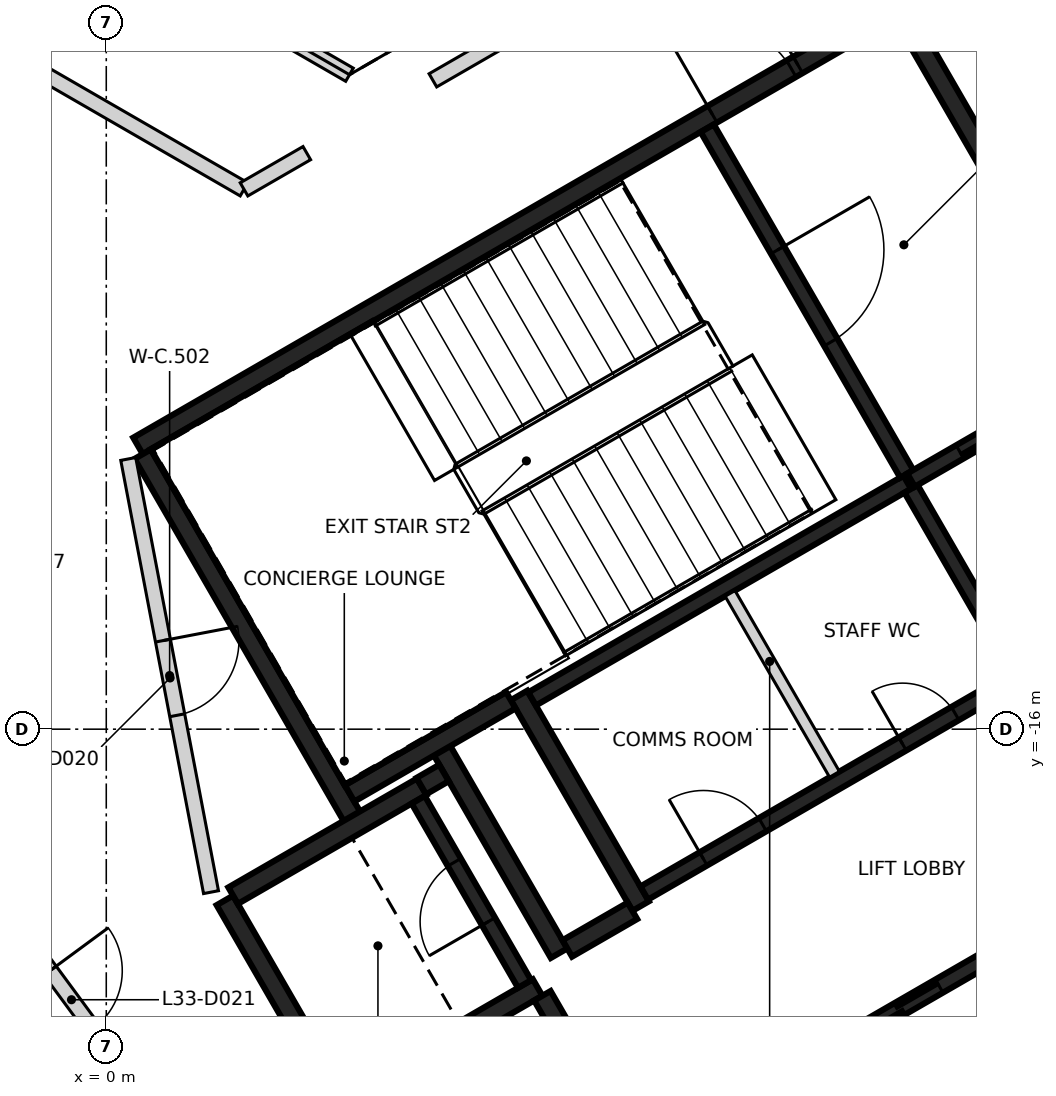
"""IFC4 building model, lengths in metres.
Left out: names, types, materials, properties, quantities, classifications, styles, units other than length and angle.
Written with IfcOpenShell. Run it as: python <this file> out.ifc"""

import sys

from ifc_helpers import new_model, si_unit, direction, frame, frame_2d, origin, place, context, subcontext, project, spatial, rectangle, extrude, element, fill, save


model = new_model("IFC4")
c1 = context("Model", 3, precision=1e-05, world=origin(), true_north=direction((0.0, 1.0)))
c2 = subcontext(c1, "Body", "Model", "MODEL_VIEW")
j1 = project(units=[si_unit("LENGTHUNIT", "METRE"), si_unit("PLANEANGLEUNIT", "RADIAN")], contexts=[c1])
p1 = place(None, origin())
s1 = spatial("IfcSite", under=j1, at=p1, CompositionType="ELEMENT")
p2 = place(p1, origin())
s2 = spatial("IfcBuilding", under=s1, at=p2, CompositionType="ELEMENT")
p3 = place(p2, frame((0.0, 0.0, 136.0)))
s3 = spatial("IfcBuildingStorey", under=s2, at=p3, CompositionType="ELEMENT", Elevation=136.0)
p4 = place(p3, frame((0.417, -12.273, 0.0), z_axis=(0.0, 0.0, 1.0), x_axis=(0.866021906294, 0.500006057782, 0.0)))
e1 = element("IfcWall", 1, at=p4, inside=s3, PredefinedType="SHEAR", context=c2, shape_type="SweptSolid", body=[
    extrude(rectangle(XDim=11.55, YDim=0.25, at=frame_2d((5.775, 0.0))), origin(), (0.0, 0.0, 1.0), 3.2),
])
p5 = place(p4, frame((10.025, 0.0, 0.0)))
e2 = element("IfcOpeningElement", 2, at=p5, cuts=e1, PredefinedType="OPENING", context=c2, shape_type="SweptSolid", body=[
    extrude(rectangle(XDim=1.2, YDim=2.1, at=frame_2d((0.6, 1.05))), frame((0.0, 0.135, 0.0), z_axis=(0.0, -1.0, 0.0), x_axis=(1.0, 0.0, 0.0)), (0.0, 0.0, 1.0), 0.27),
])
p6 = place(p4, frame((8.725, 0.0, 0.0)))
e3 = element("IfcOpeningElement", 3, at=p6, cuts=e1, PredefinedType="OPENING", context=c2, shape_type="SweptSolid", body=[
    extrude(rectangle(XDim=1.2, YDim=2.1, at=frame_2d((0.6, 1.05))), frame((0.0, 0.135, 0.0), z_axis=(0.0, -1.0, 0.0), x_axis=(1.0, 0.0, 0.0)), (0.0, 0.0, 1.0), 0.27),
])
p7 = place(p3, frame((3.235, -17.153, 0.0), z_axis=(0.0, 0.0, 1.0), x_axis=(-0.500008851346, 0.866020293397, 0.0)))
e4 = element("IfcWall", 4, at=p7, inside=s3, PredefinedType="SHEAR", context=c2, shape_type="SweptSolid", body=[
    extrude(rectangle(XDim=5.51, YDim=0.25, at=frame_2d((2.755, 0.0))), origin(), (0.0, 0.0, 1.0), 3.2),
])
p8 = place(p3, frame((10.483, -6.606, 0.0), z_axis=(0.0, 0.0, 1.0), x_axis=(0.49999885962, -0.866026062182, 0.0)))
e5 = element("IfcWall", 5, at=p8, inside=s3, PredefinedType="SHEAR", context=c2, shape_type="SweptSolid", body=[
    extrude(rectangle(XDim=5.225, YDim=0.25, at=frame_2d((2.612, 0.0))), origin(), (0.0, 0.0, 1.0), 3.2),
])
p9 = place(p3, frame((7.031, -18.327, 0.0), z_axis=(0.0, 0.0, 1.0), x_axis=(-0.499971222258, 0.866042017984, 0.0)))
e6 = element("IfcWall", 6, at=p9, inside=s3, PredefinedType="SHEAR", context=c2, shape_type="SweptSolid", body=[
    extrude(rectangle(XDim=3.2, YDim=0.25, at=frame_2d((1.6, 0.0))), origin(), (0.0, 0.0, 1.0), 3.2),
])
p10 = place(p3, frame((3.085, -20.894, 0.0), z_axis=(0.0, 0.0, 1.0), x_axis=(-0.499978833458, 0.866037623948, 0.0)))
e7 = element("IfcWall", 7, at=p10, inside=s3, PredefinedType="SHEAR", context=c2, shape_type="SweptSolid", body=[
    extrude(rectangle(XDim=3.05, YDim=0.25, at=frame_2d((1.525, 0.0))), origin(), (0.0, 0.0, 1.0), 3.2),
])
p11 = place(p3, frame((1.669, -18.19, 0.0), z_axis=(0.0, 0.0, 1.0), x_axis=(0.866042235819, 0.499970844928, 0.0)))
e8 = element("IfcWall", 8, at=p11, inside=s3, PredefinedType="SHEAR", context=c2, shape_type="SweptSolid", body=[
    extrude(rectangle(XDim=2.865, YDim=0.25, at=frame_2d((1.432, 0.0))), origin(), (0.0, 0.0, 1.0), 3.2),
])
p12 = place(p3, frame((5.675, -19.399, 0.0), z_axis=(0.0, 0.0, 1.0), x_axis=(-0.866026637627, -0.499997862916, 0.0)))
e9 = element("IfcWall", 9, at=p12, inside=s3, PredefinedType="SHEAR", context=c2, shape_type="SweptSolid", body=[
    extrude(rectangle(XDim=2.865, YDim=0.25, at=frame_2d((1.432, 0.0))), origin(), (0.0, 0.0, 1.0), 3.2),
])
p13 = place(p3, frame((4.414, -16.276, 0.0), z_axis=(0.0, 0.0, 1.0), x_axis=(0.500003324108, -0.866023484601, 0.0)))
e10 = element("IfcWall", 10, at=p13, inside=s3, PredefinedType="SHEAR", context=c2, shape_type="SweptSolid", body=[
    extrude(rectangle(XDim=3.085, YDim=0.25, at=frame_2d((1.542, 0.0))), origin(), (0.0, 0.0, 1.0), 3.2),
])
p14 = place(p3, frame((5.322, -15.619, 0.0), z_axis=(0.0, 0.0, 1.0), x_axis=(-0.866026229868, -0.499998569178, 0.0)))
e11 = element("IfcWall", 11, at=p14, inside=s3, PredefinedType="SHEAR", context=c2, shape_type="SweptSolid", body=[
    extrude(rectangle(XDim=2.449, YDim=0.25, at=frame_2d((1.225, 0.0))), origin(), (0.0, 0.0, 1.0), 3.2),
])
p15 = place(p3, frame((6.065, -18.885, 0.0), z_axis=(0.0, 0.0, 1.0), x_axis=(0.866017078145, 0.500014420154, 0.0)))
e12 = element("IfcWall", 12, at=p15, inside=s3, PredefinedType="SHEAR", context=c2, shape_type="SweptSolid", body=[
    extrude(rectangle(XDim=0.989, YDim=0.25, at=frame_2d((0.495, 0.0))), origin(), (0.0, 0.0, 1.0), 3.2),
])
p16 = place(p3, frame((6.08, -20.1, 0.0), z_axis=(0.0, 0.0, 1.0), x_axis=(-0.500051773299, 0.865995510393, 0.0)))
e13 = element("IfcWall", 13, at=p16, inside=s3, PredefinedType="SHEAR", context=c2, shape_type="SweptSolid", body=[
    extrude(rectangle(XDim=0.685, YDim=0.25, at=frame_2d((0.342, 0.0))), origin(), (0.0, 0.0, 1.0), 3.2),
])
p17 = place(p3, frame((4.145, -16.749, 0.0), z_axis=(0.0, 0.0, 1.0), x_axis=(0.866185586049, 0.49972245349, 0.0)))
e14 = element("IfcWall", 14, at=p17, inside=s3, PredefinedType="SHEAR", context=c2, shape_type="SweptSolid", body=[
    extrude(rectangle(XDim=0.344, YDim=0.25, at=frame_2d((0.172, 0.0))), origin(), (0.0, 0.0, 1.0), 3.2),
])
p18 = place(p3, frame((9.052, -20.48, 0.0), z_axis=(0.0, 0.0, 1.0), x_axis=(0.866030299012, 0.499991521122, 0.0)))
e15 = element("IfcWall", 15, at=p18, inside=s3, PredefinedType="SHEAR", context=c2, shape_type="SweptSolid", body=[
    extrude(rectangle(XDim=6.1, YDim=0.2, at=frame_2d((3.05, 0.0))), origin(), (0.0, 0.0, 1.0), 3.2),
])
p19 = place(p18, frame((1.0, 0.0, 0.0)))
e16 = element("IfcOpeningElement", 16, at=p19, cuts=e15, PredefinedType="OPENING", context=c2, shape_type="SweptSolid", body=[
    extrude(rectangle(XDim=1.2, YDim=2.1, at=frame_2d((0.6, 1.05))), frame((0.0, 0.11, 0.0), z_axis=(0.0, -1.0, 0.0), x_axis=(1.0, 0.0, 0.0)), (0.0, 0.0, 1.0), 0.22),
])
p20 = place(p18, frame((4.05, 0.0, 0.0)))
e17 = element("IfcOpeningElement", 17, at=p20, cuts=e15, PredefinedType="OPENING", context=c2, shape_type="SweptSolid", body=[
    extrude(rectangle(XDim=1.2, YDim=2.1, at=frame_2d((0.6, 1.05))), frame((0.0, 0.11, 0.0), z_axis=(0.0, -1.0, 0.0), x_axis=(1.0, 0.0, 0.0)), (0.0, 0.0, 1.0), 0.22),
])
p21 = place(p3, frame((10.538, -12.752, 0.0), z_axis=(0.0, 0.0, 1.0), x_axis=(-0.866038630372, -0.499977090179, 0.0)))
e18 = element("IfcWall", 18, at=p21, inside=s3, PredefinedType="SHEAR", context=c2, shape_type="SweptSolid", body=[
    extrude(rectangle(XDim=5.699, YDim=0.2, at=frame_2d((2.85, 0.0))), origin(), (0.0, 0.0, 1.0), 3.2),
])
p22 = place(p3, frame((7.077, -18.156, 0.0), z_axis=(0.0, 0.0, 1.0), x_axis=(0.866038630372, 0.499977090179, 0.0)))
e19 = element("IfcWall", 19, at=p22, inside=s3, PredefinedType="SHEAR", context=c2, shape_type="SweptSolid", body=[
    extrude(rectangle(XDim=5.699, YDim=0.2, at=frame_2d((2.85, 0.0))), origin(), (0.0, 0.0, 1.0), 3.2),
])
p23 = place(p22, frame((0.899, 0.0, 0.0)))
e20 = element("IfcOpeningElement", 20, at=p23, cuts=e19, PredefinedType="OPENING", context=c2, shape_type="SweptSolid", body=[
    extrude(rectangle(XDim=0.9, YDim=2.1, at=frame_2d((0.45, 1.05))), frame((0.0, 0.11, 0.0), z_axis=(0.0, -1.0, 0.0), x_axis=(1.0, 0.0, 0.0)), (0.0, 0.0, 1.0), 0.22),
])
p24 = place(p22, frame((3.924, 0.0, 0.0)))
e21 = element("IfcOpeningElement", 21, at=p24, cuts=e19, PredefinedType="OPENING", context=c2, shape_type="SweptSolid", body=[
    extrude(rectangle(XDim=0.8, YDim=2.1, at=frame_2d((0.4, 1.05))), frame((0.0, 0.11, 0.0), z_axis=(0.0, -1.0, 0.0), x_axis=(1.0, 0.0, 0.0)), (0.0, 0.0, 1.0), 0.22),
])
p25 = place(p3, frame((7.906, -8.094, 0.0), z_axis=(0.0, 0.0, 1.0), x_axis=(0.500024287448, -0.866011380966, 0.0)))
e22 = element("IfcWall", 22, at=p25, inside=s3, PredefinedType="SHEAR", context=c2, shape_type="SweptSolid", body=[
    extrude(rectangle(XDim=5.251, YDim=0.2, at=frame_2d((2.625, 0.0))), origin(), (0.0, 0.0, 1.0), 3.2),
])
p26 = place(p25, frame((1.849, 0.0, 0.0)))
e23 = element("IfcOpeningElement", 23, at=p26, cuts=e22, PredefinedType="OPENING", context=c2, shape_type="SweptSolid", body=[
    extrude(rectangle(XDim=1.4, YDim=2.1, at=frame_2d((0.7, 1.05))), frame((0.0, 0.11, 0.0), z_axis=(0.0, -1.0, 0.0), x_axis=(1.0, 0.0, 0.0)), (0.0, 0.0, 1.0), 0.22),
])
p27 = place(p3, frame((5.503, -19.352, 0.0), z_axis=(0.0, 0.0, 1.0), x_axis=(-0.499986818241, 0.866033014143, 0.0)))
e24 = element("IfcWall", 24, at=p27, inside=s3, PredefinedType="SHEAR", context=c2, shape_type="SweptSolid", body=[
    extrude(rectangle(XDim=2.798, YDim=0.2, at=frame_2d((1.399, 0.0))), origin(), (0.0, 0.0, 1.0), 3.2),
])
p28 = place(p27, frame((0.949, 0.0, 0.0)))
e25 = element("IfcOpeningElement", 25, at=p28, cuts=e24, PredefinedType="OPENING", context=c2, shape_type="SweptSolid", body=[
    extrude(rectangle(XDim=0.9, YDim=2.1, at=frame_2d((0.45, 1.05))), frame((0.0, 0.11, 0.0), z_axis=(0.0, -1.0, 0.0), x_axis=(1.0, 0.0, 0.0)), (0.0, 0.0, 1.0), 0.22),
])
p29 = place(p3, frame((11.963, -15.22, 0.0), z_axis=(0.0, 0.0, 1.0), x_axis=(-0.500034990121, 0.866005201286, 0.0)))
e26 = element("IfcWall", 26, at=p29, inside=s3, PredefinedType="SHEAR", context=c2, shape_type="SweptSolid", body=[
    extrude(rectangle(XDim=2.75, YDim=0.2, at=frame_2d((1.375, 0.0))), origin(), (0.0, 0.0, 1.0), 3.2),
])
p30 = place(p3, frame((10.587, -12.723, 0.0), z_axis=(0.0, 0.0, 1.0), x_axis=(0.866037306777, 0.499979382845, 0.0)))
e27 = element("IfcWall", 27, at=p30, inside=s3, PredefinedType="SHEAR", context=c2, shape_type="SweptSolid", body=[
    extrude(rectangle(XDim=2.742, YDim=0.2, at=frame_2d((1.371, 0.0))), origin(), (0.0, 0.0, 1.0), 3.2),
])
p31 = place(p30, frame((0.743, 0.0, 0.0)))
e28 = element("IfcOpeningElement", 28, at=p31, cuts=e27, PredefinedType="OPENING", context=c2, shape_type="SweptSolid", body=[
    extrude(rectangle(XDim=1.3, YDim=2.1, at=frame_2d((0.65, 1.05))), frame((0.0, 0.11, 0.0), z_axis=(0.0, -1.0, 0.0), x_axis=(1.0, 0.0, 0.0)), (0.0, 0.0, 1.0), 0.22),
])
p32 = place(p3, frame((8.207, -14.214, 0.0), z_axis=(0.0, 0.0, 1.0), x_axis=(0.50002746344, -0.86600954718, 0.0)))
e29 = element("IfcWall", 29, at=p32, inside=s3, PredefinedType="PARTITIONING", context=c2, shape_type="SweptSolid", body=[
    extrude(rectangle(XDim=2.748, YDim=0.15, at=frame_2d((1.374, 0.0))), origin(), (0.0, 0.0, 1.0), 3.2),
])
p33 = place(p3, frame((-8.612, -2.88, 0.0), z_axis=(0.0, 0.0, 1.0), x_axis=(0.866035279512, -0.499982894348, 0.0)))
e30 = element("IfcWall", 30, at=p33, inside=s3, PredefinedType="PARTITIONING", context=c2, shape_type="SweptSolid", body=[
    extrude(rectangle(XDim=12.037, YDim=0.2, at=frame_2d((6.018, 0.0))), origin(), (0.0, 0.0, 1.0), 3.2),
])
p34 = place(p33, frame((1.484, 0.0, 0.0)))
e31 = element("IfcOpeningElement", 31, at=p34, cuts=e30, PredefinedType="OPENING", context=c2, shape_type="SweptSolid", body=[
    extrude(rectangle(XDim=0.9, YDim=2.1, at=frame_2d((0.45, 1.05))), frame((0.0, 0.11, 0.0), z_axis=(0.0, -1.0, 0.0), x_axis=(1.0, 0.0, 0.0)), (0.0, 0.0, 1.0), 0.22),
])
p35 = place(p33, frame((7.491, 0.0, 0.0)))
e32 = element("IfcOpeningElement", 32, at=p35, cuts=e30, PredefinedType="OPENING", context=c2, shape_type="SweptSolid", body=[
    extrude(rectangle(XDim=0.9, YDim=2.1, at=frame_2d((0.45, 1.05))), frame((0.0, 0.11, 0.0), z_axis=(0.0, -1.0, 0.0), x_axis=(1.0, 0.0, 0.0)), (0.0, 0.0, 1.0), 0.22),
])
p36 = place(p3, frame((-0.858, -19.016, 0.0), z_axis=(0.0, 0.0, 1.0), x_axis=(0.593123867414, -0.805111220829, 0.0)))
e33 = element("IfcWall", 33, at=p36, inside=s3, PredefinedType="PARTITIONING", context=c2, shape_type="SweptSolid", body=[
    extrude(rectangle(XDim=2.77, YDim=0.2, at=frame_2d((1.385, 0.0))), origin(), (0.0, 0.0, 1.0), 3.2),
])
p37 = place(p36, frame((0.2, 0.0, 0.0)))
e34 = element("IfcOpeningElement", 34, at=p37, cuts=e33, PredefinedType="OPENING", context=c2, shape_type="SweptSolid", body=[
    extrude(rectangle(XDim=0.95, YDim=2.1, at=frame_2d((0.475, 1.05))), frame((0.0, 0.11, 0.0), z_axis=(0.0, -1.0, 0.0), x_axis=(1.0, 0.0, 0.0)), (0.0, 0.0, 1.0), 0.22),
])
p38 = place(p3, frame((0.289, -12.445, 0.0), z_axis=(0.0, 0.0, 1.0), x_axis=(0.187668946952, -0.982232338273, 0.0)))
e35 = element("IfcWall", 35, at=p38, inside=s3, PredefinedType="PARTITIONING", context=c2, shape_type="SweptSolid", body=[
    extrude(rectangle(XDim=5.802, YDim=0.2, at=frame_2d((2.901, 0.0))), origin(), (0.0, 0.0, 1.0), 3.2),
])
p39 = place(p38, frame((2.433, 0.0, 0.0)))
e36 = element("IfcOpeningElement", 36, at=p39, cuts=e35, PredefinedType="OPENING", context=c2, shape_type="SweptSolid", body=[
    extrude(rectangle(XDim=1.0, YDim=2.1, at=frame_2d((0.5, 1.05))), frame((0.0, 0.11, 0.0), z_axis=(0.0, -1.0, 0.0), x_axis=(1.0, 0.0, 0.0)), (0.0, 0.0, 1.0), 0.22),
])
p40 = place(p3, frame((1.812, -8.898, 0.0), z_axis=(0.0, 0.0, 1.0), x_axis=(0.866108878364, 0.499855389907, 0.0)))
e37 = element("IfcWall", 37, at=p40, inside=s3, PredefinedType="PARTITIONING", context=c2, shape_type="SweptSolid", body=[
    extrude(rectangle(XDim=0.954, YDim=0.2, at=frame_2d((0.477, 0.0))), origin(), (0.0, 0.0, 1.0), 3.2),
])
p41 = place(p3, frame((4.297, -7.464, 0.0), z_axis=(0.0, 0.0, 1.0), x_axis=(0.86602521942, 0.500000319328, 0.0)))
e38 = element("IfcWall", 38, at=p41, inside=s3, PredefinedType="PARTITIONING", context=c2, shape_type="SweptSolid", body=[
    extrude(rectangle(XDim=2.89, YDim=0.2, at=frame_2d((1.445, 0.0))), origin(), (0.0, 0.0, 1.0), 2.3),
])
p42 = place(p3, frame((-8.0, -0.924, 0.0), z_axis=(0.0, 0.0, 1.0), x_axis=(0.86604129137, -0.499972480886, 0.0)))
e39 = element("IfcWall", 39, at=p42, inside=s3, PredefinedType="PARTITIONING", context=c2, shape_type="SweptSolid", body=[
    extrude(rectangle(XDim=12.932, YDim=0.2, at=frame_2d((6.466, 0.0))), origin(), (0.0, 0.0, 1.0), 2.3),
])
p43 = place(p31, origin())
e40 = element("IfcDoor", 40, at=p43, inside=s3, OperationType="SLIDING_TO_RIGHT", PredefinedType="DOOR", context=c2, shape_type="SweptSolid", body=[
    extrude(rectangle(XDim=1.3, YDim=2.1, at=frame_2d((0.65, 1.05))), frame((0.0, 0.025, 0.0), z_axis=(0.0, -1.0, 0.0), x_axis=(1.0, 0.0, 0.0)), (0.0, 0.0, 1.0), 0.05),
])
fill(e28, e40)
p44 = place(p19, origin())
e41 = element("IfcDoor", 41, at=p44, inside=s3, OperationType="DOUBLE_DOOR_SLIDING", PredefinedType="DOOR", context=c2, shape_type="SweptSolid", body=[
    extrude(rectangle(XDim=1.2, YDim=2.1, at=frame_2d((0.6, 1.05))), frame((0.0, 0.025, 0.0), z_axis=(0.0, -1.0, 0.0), x_axis=(1.0, 0.0, 0.0)), (0.0, 0.0, 1.0), 0.05),
])
fill(e16, e41)
p45 = place(p5, origin())
e42 = element("IfcDoor", 42, at=p45, inside=s3, OperationType="SINGLE_SWING_LEFT", PredefinedType="DOOR", context=c2, shape_type="SweptSolid", body=[
    extrude(rectangle(XDim=1.2, YDim=2.1, at=frame_2d((0.6, 1.05))), frame((0.0, 0.025, 0.0), z_axis=(0.0, -1.0, 0.0), x_axis=(1.0, 0.0, 0.0)), (0.0, 0.0, 1.0), 0.05),
])
fill(e2, e42)
p46 = place(p6, origin())
e43 = element("IfcDoor", 43, at=p46, inside=s3, OperationType="SINGLE_SWING_RIGHT", PredefinedType="DOOR", context=c2, shape_type="SweptSolid", body=[
    extrude(rectangle(XDim=1.2, YDim=2.1, at=frame_2d((0.6, 1.05))), frame((0.0, 0.025, 0.0), z_axis=(0.0, -1.0, 0.0), x_axis=(1.0, 0.0, 0.0)), (0.0, 0.0, 1.0), 0.05),
])
fill(e3, e43)
p47 = place(p26, origin())
e44 = element("IfcDoor", 44, at=p47, inside=s3, OperationType="SINGLE_SWING_RIGHT", PredefinedType="DOOR", context=c2, shape_type="SweptSolid", body=[
    extrude(rectangle(XDim=1.4, YDim=2.1, at=frame_2d((0.7, 1.05))), frame((0.0, 0.025, 0.0), z_axis=(0.0, -1.0, 0.0), x_axis=(1.0, 0.0, 0.0)), (0.0, 0.0, 1.0), 0.05),
])
fill(e23, e44)
p48 = place(p23, origin())
e45 = element("IfcDoor", 45, at=p48, inside=s3, OperationType="SINGLE_SWING_LEFT", PredefinedType="DOOR", context=c2, shape_type="SweptSolid", body=[
    extrude(rectangle(XDim=0.9, YDim=2.1, at=frame_2d((0.45, 1.05))), frame((0.0, 0.025, 0.0), z_axis=(0.0, -1.0, 0.0), x_axis=(1.0, 0.0, 0.0)), (0.0, 0.0, 1.0), 0.05),
])
fill(e20, e45)
p49 = place(p24, origin())
e46 = element("IfcDoor", 46, at=p49, inside=s3, OperationType="SINGLE_SWING_RIGHT", PredefinedType="DOOR", context=c2, shape_type="SweptSolid", body=[
    extrude(rectangle(XDim=0.8, YDim=2.1, at=frame_2d((0.4, 1.05))), frame((0.0, 0.025, 0.0), z_axis=(0.0, -1.0, 0.0), x_axis=(1.0, 0.0, 0.0)), (0.0, 0.0, 1.0), 0.05),
])
fill(e21, e46)
p50 = place(p28, origin())
e47 = element("IfcDoor", 47, at=p50, inside=s3, OperationType="SINGLE_SWING_LEFT", PredefinedType="DOOR", context=c2, shape_type="SweptSolid", body=[
    extrude(rectangle(XDim=0.9, YDim=2.1, at=frame_2d((0.45, 1.05))), frame((0.0, 0.025, 0.0), z_axis=(0.0, -1.0, 0.0), x_axis=(1.0, 0.0, 0.0)), (0.0, 0.0, 1.0), 0.05),
])
fill(e25, e47)
p51 = place(p39, origin())
e48 = element("IfcDoor", 48, at=p51, inside=s3, OperationType="SINGLE_SWING_LEFT", PredefinedType="DOOR", context=c2, shape_type="SweptSolid", body=[
    extrude(rectangle(XDim=1.0, YDim=2.1, at=frame_2d((0.5, 1.05))), frame((0.0, 0.025, 0.0), z_axis=(0.0, -1.0, 0.0), x_axis=(1.0, 0.0, 0.0)), (0.0, 0.0, 1.0), 0.05),
])
fill(e36, e48)
p52 = place(p37, frame((0.95, 0.0, 0.0), z_axis=(0.0, 0.0, 1.0), x_axis=(-1.0, 0.0, 0.0)))
e49 = element("IfcDoor", 49, at=p52, inside=s3, OperationType="SINGLE_SWING_LEFT", PredefinedType="DOOR", context=c2, shape_type="SweptSolid", body=[
    extrude(rectangle(XDim=0.95, YDim=2.1, at=frame_2d((0.475, 1.05))), frame((0.0, 0.025, 0.0), z_axis=(0.0, -1.0, 0.0), x_axis=(1.0, 0.0, 0.0)), (0.0, 0.0, 1.0), 0.05),
])
fill(e34, e49)
save(model, sys.argv[1])
